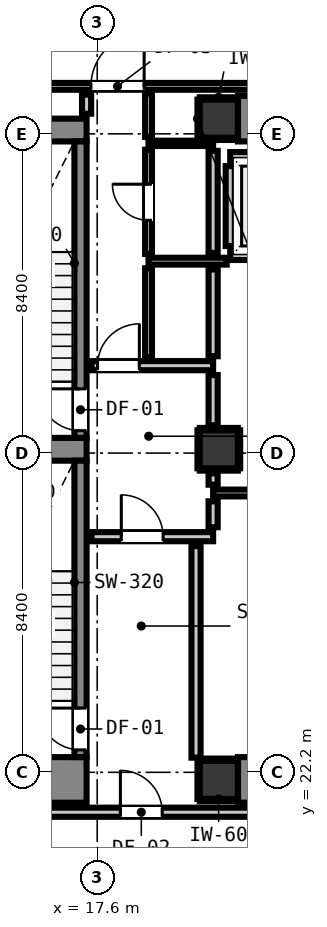
"""IFC4 building model, lengths in metres.
Left out: names, types, materials, properties, quantities, classifications, styles, units other than length and angle.
Written with IfcOpenShell. Run it as: python <this file> out.ifc"""

import sys

from ifc_helpers import new_model, si_unit, direction, frame, frame_2d, origin, origin_2d, place, context, subcontext, project, spatial, rectangle, extrude, element, fill, save


model = new_model("IFC4")
c1 = context("Model", 3, precision=1e-05, world=origin(), true_north=direction((0.0, 1.0)))
c2 = subcontext(c1, "Body", "Model", "MODEL_VIEW")
j1 = project(units=[si_unit("LENGTHUNIT", "METRE"), si_unit("PLANEANGLEUNIT", "RADIAN")], contexts=[c1])
p1 = place(None, origin())
s1 = spatial("IfcSite", under=j1, at=p1, CompositionType="ELEMENT")
p2 = place(p1, origin())
s2 = spatial("IfcBuilding", under=s1, at=p2, CompositionType="ELEMENT")
p3 = place(p2, frame((0.0, 0.0, 13.6)))
s3 = spatial("IfcBuildingStorey", under=s2, at=p3, CompositionType="ELEMENT", Elevation=13.6)
for number, where, z_axis, x_axis in (
    (1, (20.8, 22.0, 0.0), (0.0, 0.0, 1.0), (1.0, 0.0, 0.0)),
    (2, (20.8, 39.4, 0.0), (0.0, 0.0, 1.0), (1.0, 0.0, 0.0)),
):
    element("IfcColumn", number, at=place(p3, frame(where, z_axis=z_axis, x_axis=x_axis)), inside=s3, PredefinedType="COLUMN", context=c2, shape_type="SweptSolid", body=[
        extrude(rectangle(XDim=1.0, YDim=1.0, at=origin_2d()), origin(), (0.0, 0.0, 1.0), 4.2),
    ])
p4 = place(p3, frame((13.24, 22.0, 0.0), z_axis=(0.0, 0.0, 1.0), x_axis=(1.0, 0.0, 0.0)))
e3 = element("IfcWall", 3, at=p4, inside=s3, PredefinedType="SHEAR", context=c2, shape_type="SweptSolid", body=[
    extrude(rectangle(XDim=4.08, YDim=1.2, at=frame_2d((2.04, 0.0))), origin(), (0.0, 0.0, 1.0), 4.2),
])
p5 = place(p3, frame((13.24, 39.1, 0.0), z_axis=(0.0, 0.0, 1.0), x_axis=(1.0, 0.0, 0.0)))
e4 = element("IfcWall", 4, at=p5, inside=s3, PredefinedType="SHEAR", context=c2, shape_type="SweptSolid", body=[
    extrude(rectangle(XDim=4.08, YDim=0.6, at=frame_2d((2.04, 0.0))), origin(), (0.0, 0.0, 1.0), 4.2),
])
p6 = place(p3, frame((13.905, 30.7, 0.0), z_axis=(0.0, 0.0, 1.0), x_axis=(1.0, 0.0, 0.0)))
e5 = element("IfcWall", 5, at=p6, inside=s3, PredefinedType="SHEAR", context=c2, shape_type="SweptSolid", body=[
    extrude(rectangle(XDim=3.415, YDim=0.6, at=frame_2d((1.708, 0.0))), origin(), (0.0, 0.0, 1.0), 4.2),
])
for number, where, z_axis, x_axis in (
    (6, (21.305, 22.0, 0.0), (0.0, 0.0, 1.0), (1.0, 0.0, 0.0)),
    (7, (21.305, 39.4, 0.0), (0.0, 0.0, 1.0), (1.0, 0.0, 0.0)),
):
    element("IfcWall", number, at=place(p3, frame(where, z_axis=z_axis, x_axis=x_axis)), inside=s3, PredefinedType="SHEAR", context=c2, shape_type="SweptSolid", body=[
        extrude(rectangle(XDim=7.39, YDim=1.2, at=frame_2d((3.695, 0.0))), origin(), (0.0, 0.0, 1.0), 4.2),
    ])
p7 = place(p3, frame((17.16, 31.0, 0.0), z_axis=(0.0, 0.0, 1.0), x_axis=(0.0, 1.0, 0.0)))
e8 = element("IfcWall", 8, at=p7, inside=s3, PredefinedType="SHEAR", context=c2, shape_type="SweptSolid", body=[
    extrude(rectangle(XDim=7.8, YDim=0.32, at=frame_2d((3.9, 0.0))), origin(), (0.0, 0.0, 1.0), 4.2),
])
p8 = place(p7, frame((0.19, 0.0, 0.0)))
e9 = element("IfcOpeningElement", 9, at=p8, cuts=e8, PredefinedType="OPENING", context=c2, shape_type="SweptSolid", body=[
    extrude(rectangle(XDim=1.1, YDim=2.15, at=frame_2d((0.55, 1.075))), frame((0.0, 0.17, 0.0), z_axis=(0.0, -1.0, 0.0), x_axis=(1.0, 0.0, 0.0)), (0.0, 0.0, 1.0), 0.34),
])
p9 = place(p3, frame((17.16, 22.6, 0.0), z_axis=(0.0, 0.0, 1.0), x_axis=(0.0, 1.0, 0.0)))
e10 = element("IfcWall", 10, at=p9, inside=s3, PredefinedType="SHEAR", context=c2, shape_type="SweptSolid", body=[
    extrude(rectangle(XDim=7.8, YDim=0.32, at=frame_2d((3.9, 0.0))), origin(), (0.0, 0.0, 1.0), 4.2),
])
p10 = place(p9, frame((0.19, 0.0, 0.0)))
e11 = element("IfcOpeningElement", 11, at=p10, cuts=e10, PredefinedType="OPENING", context=c2, shape_type="SweptSolid", body=[
    extrude(rectangle(XDim=1.1, YDim=2.15, at=frame_2d((0.55, 1.075))), frame((0.0, 0.17, 0.0), z_axis=(0.0, -1.0, 0.0), x_axis=(1.0, 0.0, 0.0)), (0.0, 0.0, 1.0), 0.34),
])
p11 = place(p3, frame((20.8, 30.7, 0.0), z_axis=(0.0, 0.0, 1.0), x_axis=(1.0, 0.0, 0.0)))
e12 = element("IfcColumn", 12, at=p11, inside=s3, PredefinedType="COLUMN", context=c2, shape_type="SweptSolid", body=[
    extrude(rectangle(XDim=1.0, YDim=1.0, at=origin_2d()), origin(), (0.0, 0.0, 1.0), 4.2),
])
for number, where, z_axis, x_axis in (
    (13, (21.1, 35.8, 0.0), (0.0, 0.0, 1.0), (1.0, 0.0, 0.0)),
    (14, (21.1, 38.4, 0.0), (0.0, 0.0, 1.0), (1.0, 0.0, 0.0)),
):
    element("IfcWall", number, at=place(p3, frame(where, z_axis=z_axis, x_axis=x_axis)), inside=s3, PredefinedType="PARTITIONING", context=c2, shape_type="SweptSolid", body=[
        extrude(rectangle(XDim=2.2, YDim=0.24, at=frame_2d((1.1, 0.0))), origin(), (0.0, 0.0, 1.0), 3.78),
    ])
p12 = place(p3, frame((21.1, 36.048, 0.0), z_axis=(0.0, 0.0, 1.0), x_axis=(0.0, 1.0, 0.0)))
e15 = element("IfcWall", 15, at=p12, inside=s3, PredefinedType="PARTITIONING", context=c2, shape_type="SweptSolid", body=[
    extrude(rectangle(XDim=2.104, YDim=0.24, at=frame_2d((1.052, 0.0))), origin(), (0.0, 0.0, 1.0), 2.815),
])
p13 = place(p3, frame((10.5, 21.15, 0.0), z_axis=(0.0, 0.0, 1.0), x_axis=(1.0, 0.0, 0.0)))
e16 = element("IfcWall", 16, at=p13, inside=s3, PredefinedType="PARTITIONING", context=c2, shape_type="SweptSolid", body=[
    extrude(rectangle(XDim=28.7, YDim=0.24, at=frame_2d((14.35, 0.0))), origin(), (0.0, 0.0, 1.0), 3.78),
])
p14 = place(p13, frame((7.71, 0.0, 0.0)))
e17 = element("IfcOpeningElement", 17, at=p14, cuts=e16, PredefinedType="OPENING", context=c2, shape_type="SweptSolid", body=[
    extrude(rectangle(XDim=1.1, YDim=2.15, at=frame_2d((0.55, 1.075))), frame((0.0, 0.13, 0.0), z_axis=(0.0, -1.0, 0.0), x_axis=(1.0, 0.0, 0.0)), (0.0, 0.0, 1.0), 0.26),
])
p15 = place(p13, frame((0.324, 0.0, 0.0)))
e18 = element("IfcOpeningElement", 18, at=p15, cuts=e16, PredefinedType="OPENING", context=c2, shape_type="SweptSolid", body=[
    extrude(rectangle(XDim=1.4, YDim=2.15, at=frame_2d((0.7, 1.075))), frame((0.0, 0.13, 0.0), z_axis=(0.0, -1.0, 0.0), x_axis=(1.0, 0.0, 0.0)), (0.0, 0.0, 1.0), 0.26),
])
p16 = place(p13, frame((27.026, 0.0, 0.0)))
e19 = element("IfcOpeningElement", 19, at=p16, cuts=e16, PredefinedType="OPENING", context=c2, shape_type="SweptSolid", body=[
    extrude(rectangle(XDim=1.4, YDim=2.15, at=frame_2d((0.7, 1.075))), frame((0.0, 0.13, 0.0), z_axis=(0.0, -1.0, 0.0), x_axis=(1.0, 0.0, 0.0)), (0.0, 0.0, 1.0), 0.26),
])
p17 = place(p3, frame((17.45, 28.4, 0.0), z_axis=(0.0, 0.0, 1.0), x_axis=(1.0, 0.0, 0.0)))
e20 = element("IfcWall", 20, at=p17, inside=s3, PredefinedType="PARTITIONING", context=c2, shape_type="SweptSolid", body=[
    extrude(rectangle(XDim=3.2, YDim=0.24, at=frame_2d((1.6, 0.0))), origin(), (0.0, 0.0, 1.0), 3.78),
])
p18 = place(p17, frame((0.784, 0.0, 0.0)))
e21 = element("IfcOpeningElement", 21, at=p18, cuts=e20, PredefinedType="OPENING", context=c2, shape_type="SweptSolid", body=[
    extrude(rectangle(XDim=1.1, YDim=2.15, at=frame_2d((0.55, 1.075))), frame((0.0, 0.13, 0.0), z_axis=(0.0, -1.0, 0.0), x_axis=(1.0, 0.0, 0.0)), (0.0, 0.0, 1.0), 0.26),
])
p19 = place(p3, frame((17.45, 32.9, 0.0), z_axis=(0.0, 0.0, 1.0), x_axis=(1.0, 0.0, 0.0)))
e22 = element("IfcWall", 22, at=p19, inside=s3, PredefinedType="PARTITIONING", context=c2, shape_type="SweptSolid", body=[
    extrude(rectangle(XDim=3.2, YDim=0.24, at=frame_2d((1.6, 0.0))), origin(), (0.0, 0.0, 1.0), 3.78),
])
p20 = place(p19, frame((0.159, 0.0, 0.0)))
e23 = element("IfcOpeningElement", 23, at=p20, cuts=e22, PredefinedType="OPENING", context=c2, shape_type="SweptSolid", body=[
    extrude(rectangle(XDim=1.1, YDim=2.15, at=frame_2d((0.55, 1.075))), frame((0.0, 0.13, 0.0), z_axis=(0.0, -1.0, 0.0), x_axis=(1.0, 0.0, 0.0)), (0.0, 0.0, 1.0), 0.26),
])
p21 = place(p3, frame((20.65, 29.55, 0.0), z_axis=(0.0, 0.0, 1.0), x_axis=(1.0, 0.0, 0.0)))
e24 = element("IfcWall", 24, at=p21, inside=s3, PredefinedType="PARTITIONING", context=c2, shape_type="SweptSolid", body=[
    extrude(rectangle(XDim=9.325, YDim=0.18, at=frame_2d((4.663, 0.0))), origin(), (0.0, 0.0, 1.0), 3.78),
])
p22 = place(p3, frame((18.95, 35.65, 0.0), z_axis=(0.0, 0.0, 1.0), x_axis=(1.0, 0.0, 0.0)))
e25 = element("IfcWall", 25, at=p22, inside=s3, PredefinedType="PARTITIONING", context=c2, shape_type="SweptSolid", body=[
    extrude(rectangle(XDim=2.057, YDim=0.18, at=frame_2d((1.029, 0.0))), origin(), (0.0, 0.0, 1.0), 3.78),
])
p23 = place(p3, frame((10.5, 40.25, 0.0), z_axis=(0.0, 0.0, 1.0), x_axis=(1.0, 0.0, 0.0)))
e26 = element("IfcWall", 26, at=p23, inside=s3, PredefinedType="PARTITIONING", context=c2, shape_type="SweptSolid", body=[
    extrude(rectangle(XDim=37.2, YDim=0.18, at=frame_2d((18.6, 0.0))), origin(), (0.0, 0.0, 1.0), 3.78),
])
p24 = place(p23, frame((6.935, 0.0, 0.0)))
e27 = element("IfcOpeningElement", 27, at=p24, cuts=e26, PredefinedType="OPENING", context=c2, shape_type="SweptSolid", body=[
    extrude(rectangle(XDim=1.4, YDim=2.15, at=frame_2d((0.7, 1.075))), frame((0.0, 0.1, 0.0), z_axis=(0.0, -1.0, 0.0), x_axis=(1.0, 0.0, 0.0)), (0.0, 0.0, 1.0), 0.2),
])
p25 = place(p23, frame((0.324, 0.0, 0.0)))
e28 = element("IfcOpeningElement", 28, at=p25, cuts=e26, PredefinedType="OPENING", context=c2, shape_type="SweptSolid", body=[
    extrude(rectangle(XDim=1.4, YDim=2.15, at=frame_2d((0.7, 1.075))), frame((0.0, 0.1, 0.0), z_axis=(0.0, -1.0, 0.0), x_axis=(1.0, 0.0, 0.0)), (0.0, 0.0, 1.0), 0.2),
])
p26 = place(p23, frame((27.05, 0.0, 0.0)))
e29 = element("IfcOpeningElement", 29, at=p26, cuts=e26, PredefinedType="OPENING", context=c2, shape_type="SweptSolid", body=[
    extrude(rectangle(XDim=1.4, YDim=2.15, at=frame_2d((0.7, 1.075))), frame((0.0, 0.1, 0.0), z_axis=(0.0, -1.0, 0.0), x_axis=(1.0, 0.0, 0.0)), (0.0, 0.0, 1.0), 0.2),
])
p27 = place(p3, frame((18.95, 38.75, 0.0), z_axis=(0.0, 0.0, 1.0), x_axis=(1.0, 0.0, 0.0)))
e30 = element("IfcWall", 30, at=p27, inside=s3, PredefinedType="PARTITIONING", context=c2, shape_type="SweptSolid", body=[
    extrude(rectangle(XDim=1.7, YDim=0.14, at=frame_2d((0.85, 0.0))), origin(), (0.0, 0.0, 1.0), 3.78),
])
p28 = place(p3, frame((17.32, 39.53, 0.0), z_axis=(0.0, 0.0, 1.0), x_axis=(0.0, 1.0, 0.0)))
e31 = element("IfcWall", 31, at=p28, inside=s3, PredefinedType="PARTITIONING", context=c2, shape_type="SweptSolid", body=[
    extrude(rectangle(XDim=0.502, YDim=0.24, at=frame_2d((0.251, 0.0))), origin(), (0.0, 0.0, 1.0), 3.78),
])
p29 = place(p3, frame((20.2, 22.586, 0.0), z_axis=(0.0, 0.0, 1.0), x_axis=(0.0, 1.0, 0.0)))
e32 = element("IfcWall", 32, at=p29, inside=s3, PredefinedType="PARTITIONING", context=c2, shape_type="SweptSolid", body=[
    extrude(rectangle(XDim=5.566, YDim=0.24, at=frame_2d((2.783, 0.0))), origin(), (0.0, 0.0, 1.0), 3.78),
])
p30 = place(p3, frame((20.65, 28.648, 0.0), z_axis=(0.0, 0.0, 1.0), x_axis=(0.0, 1.0, 0.0)))
e33 = element("IfcWall", 33, at=p30, inside=s3, PredefinedType="PARTITIONING", context=c2, shape_type="SweptSolid", body=[
    extrude(rectangle(XDim=0.684, YDim=0.24, at=frame_2d((0.342, 0.0))), origin(), (0.0, 0.0, 1.0), 2.815),
])
p31 = place(p3, frame((20.65, 29.768, 0.0), z_axis=(0.0, 0.0, 1.0), x_axis=(0.0, 1.0, 0.0)))
e34 = element("IfcWall", 34, at=p31, inside=s3, PredefinedType="PARTITIONING", context=c2, shape_type="SweptSolid", body=[
    extrude(rectangle(XDim=0.3, YDim=0.24, at=frame_2d((0.15, 0.0))), origin(), (0.0, 0.0, 1.0), 2.815),
])
p32 = place(p3, frame((20.65, 31.332, 0.0), z_axis=(0.0, 0.0, 1.0), x_axis=(0.0, 1.0, 0.0)))
e35 = element("IfcWall", 35, at=p32, inside=s3, PredefinedType="PARTITIONING", context=c2, shape_type="SweptSolid", body=[
    extrude(rectangle(XDim=1.32, YDim=0.24, at=frame_2d((0.66, 0.0))), origin(), (0.0, 0.0, 1.0), 2.815),
])
p33 = place(p3, frame((20.65, 33.148, 0.0), z_axis=(0.0, 0.0, 1.0), x_axis=(0.0, 1.0, 0.0)))
e36 = element("IfcWall", 36, at=p33, inside=s3, PredefinedType="PARTITIONING", context=c2, shape_type="SweptSolid", body=[
    extrude(rectangle(XDim=2.284, YDim=0.24, at=frame_2d((1.142, 0.0))), origin(), (0.0, 0.0, 1.0), 2.815),
])
p34 = place(p3, frame((20.65, 35.868, 0.0), z_axis=(0.0, 0.0, 1.0), x_axis=(0.0, 1.0, 0.0)))
e37 = element("IfcWall", 37, at=p34, inside=s3, PredefinedType="PARTITIONING", context=c2, shape_type="SweptSolid", body=[
    extrude(rectangle(XDim=2.684, YDim=0.24, at=frame_2d((1.342, 0.0))), origin(), (0.0, 0.0, 1.0), 2.815),
])
p35 = place(p3, frame((18.95, 33.118, 0.0), z_axis=(0.0, 0.0, 1.0), x_axis=(0.0, 1.0, 0.0)))
e38 = element("IfcWall", 38, at=p35, inside=s3, PredefinedType="PARTITIONING", context=c2, shape_type="SweptSolid", body=[
    extrude(rectangle(XDim=2.344, YDim=0.18, at=frame_2d((1.172, 0.0))), origin(), (0.0, 0.0, 1.0), 3.78),
])
p36 = place(p3, frame((18.95, 35.838, 0.0), z_axis=(0.0, 0.0, 1.0), x_axis=(0.0, 1.0, 0.0)))
e39 = element("IfcWall", 39, at=p36, inside=s3, PredefinedType="PARTITIONING", context=c2, shape_type="SweptSolid", body=[
    extrude(rectangle(XDim=2.744, YDim=0.18, at=frame_2d((1.372, 0.0))), origin(), (0.0, 0.0, 1.0), 3.78),
])
p37 = place(p36, frame((0.887, 0.0, 0.0)))
e40 = element("IfcOpeningElement", 40, at=p37, cuts=e39, PredefinedType="OPENING", context=c2, shape_type="SweptSolid", body=[
    extrude(rectangle(XDim=0.95, YDim=2.1, at=frame_2d((0.475, 1.05))), frame((0.0, 0.1, 0.0), z_axis=(0.0, -1.0, 0.0), x_axis=(1.0, 0.0, 0.0)), (0.0, 0.0, 1.0), 0.2),
])
p38 = place(p3, frame((18.95, 38.918, 0.0), z_axis=(0.0, 0.0, 1.0), x_axis=(0.0, 1.0, 0.0)))
e41 = element("IfcWall", 41, at=p38, inside=s3, PredefinedType="PARTITIONING", context=c2, shape_type="SweptSolid", body=[
    extrude(rectangle(XDim=1.144, YDim=0.18, at=frame_2d((0.572, 0.0))), origin(), (0.0, 0.0, 1.0), 3.78),
])
for number, where, z_axis, x_axis in (
    (42, (20.3, 21.468, 0.0), (0.0, 0.0, 1.0), (1.0, 0.0, 0.0)),
    (43, (20.3, 22.532, 0.0), (0.0, 0.0, 1.0), (1.0, 0.0, 0.0)),
):
    element("IfcWall", number, at=place(p3, frame(where, z_axis=z_axis, x_axis=x_axis)), inside=s3, PredefinedType="PARTITIONING", context=c2, shape_type="SweptSolid", body=[
        extrude(rectangle(XDim=0.99, YDim=0.06, at=frame_2d((0.495, 0.0))), origin(), (0.0, 0.0, 1.0), 1.45),
    ])
p39 = place(p3, frame((20.268, 21.5, 0.0), z_axis=(0.0, 0.0, 1.0), x_axis=(0.0, 1.0, 0.0)))
e44 = element("IfcWall", 44, at=p39, inside=s3, PredefinedType="PARTITIONING", context=c2, shape_type="SweptSolid", body=[
    extrude(rectangle(XDim=1.0, YDim=0.06, at=frame_2d((0.5, 0.0))), origin(), (0.0, 0.0, 1.0), 1.45),
])
for number, where, z_axis, x_axis in (
    (45, (20.3, 38.868, 0.0), (0.0, 0.0, 1.0), (1.0, 0.0, 0.0)),
    (46, (20.3, 39.932, 0.0), (0.0, 0.0, 1.0), (1.0, 0.0, 0.0)),
):
    element("IfcWall", number, at=place(p3, frame(where, z_axis=z_axis, x_axis=x_axis)), inside=s3, PredefinedType="PARTITIONING", context=c2, shape_type="SweptSolid", body=[
        extrude(rectangle(XDim=0.99, YDim=0.06, at=frame_2d((0.495, 0.0))), origin(), (0.0, 0.0, 1.0), 1.45),
    ])
for number, where, z_axis, x_axis in (
    (47, (20.268, 38.9, 0.0), (0.0, 0.0, 1.0), (0.0, 1.0, 0.0)),
    (48, (20.3, 30.168, 0.0), (0.0, 0.0, 1.0), (1.0, 0.0, 0.0)),
    (49, (20.3, 31.232, 0.0), (0.0, 0.0, 1.0), (1.0, 0.0, 0.0)),
    (50, (20.268, 30.2, 0.0), (0.0, 0.0, 1.0), (0.0, 1.0, 0.0)),
    (51, (21.332, 30.2, 0.0), (0.0, 0.0, 1.0), (0.0, 1.0, 0.0)),
):
    element("IfcWall", number, at=place(p3, frame(where, z_axis=z_axis, x_axis=x_axis)), inside=s3, PredefinedType="PARTITIONING", context=c2, shape_type="SweptSolid", body=[
        extrude(rectangle(XDim=1.0, YDim=0.06, at=frame_2d((0.5, 0.0))), origin(), (0.0, 0.0, 1.0), 1.45),
    ])
p40 = place(p8, origin())
e52 = element("IfcDoor", 52, at=p40, inside=s3, OperationType="SINGLE_SWING_RIGHT", PredefinedType="DOOR", context=c2, shape_type="SweptSolid", body=[
    extrude(rectangle(XDim=1.1, YDim=2.15, at=frame_2d((0.55, 1.075))), frame((0.0, 0.025, 0.0), z_axis=(0.0, -1.0, 0.0), x_axis=(1.0, 0.0, 0.0)), (0.0, 0.0, 1.0), 0.05),
])
fill(e9, e52)
p41 = place(p10, origin())
e53 = element("IfcDoor", 53, at=p41, inside=s3, OperationType="SINGLE_SWING_RIGHT", PredefinedType="DOOR", context=c2, shape_type="SweptSolid", body=[
    extrude(rectangle(XDim=1.1, YDim=2.15, at=frame_2d((0.55, 1.075))), frame((0.0, 0.025, 0.0), z_axis=(0.0, -1.0, 0.0), x_axis=(1.0, 0.0, 0.0)), (0.0, 0.0, 1.0), 0.05),
])
fill(e11, e53)
p42 = place(p18, origin())
e54 = element("IfcDoor", 54, at=p42, inside=s3, OperationType="SINGLE_SWING_LEFT", PredefinedType="DOOR", context=c2, shape_type="SweptSolid", body=[
    extrude(rectangle(XDim=1.1, YDim=2.15, at=frame_2d((0.55, 1.075))), frame((0.0, 0.025, 0.0), z_axis=(0.0, -1.0, 0.0), x_axis=(1.0, 0.0, 0.0)), (0.0, 0.0, 1.0), 0.05),
])
fill(e21, e54)
p43 = place(p20, origin())
e55 = element("IfcDoor", 55, at=p43, inside=s3, OperationType="SINGLE_SWING_RIGHT", PredefinedType="DOOR", context=c2, shape_type="SweptSolid", body=[
    extrude(rectangle(XDim=1.1, YDim=2.15, at=frame_2d((0.55, 1.075))), frame((0.0, 0.025, 0.0), z_axis=(0.0, -1.0, 0.0), x_axis=(1.0, 0.0, 0.0)), (0.0, 0.0, 1.0), 0.05),
])
fill(e23, e55)
p44 = place(p14, origin())
e56 = element("IfcDoor", 56, at=p44, inside=s3, OperationType="SINGLE_SWING_LEFT", PredefinedType="DOOR", context=c2, shape_type="SweptSolid", body=[
    extrude(rectangle(XDim=1.1, YDim=2.15, at=frame_2d((0.55, 1.075))), frame((0.0, 0.025, 0.0), z_axis=(0.0, -1.0, 0.0), x_axis=(1.0, 0.0, 0.0)), (0.0, 0.0, 1.0), 0.05),
])
fill(e17, e56)
p45 = place(p24, origin())
e57 = element("IfcDoor", 57, at=p45, inside=s3, OperationType="SINGLE_SWING_RIGHT", PredefinedType="DOOR", context=c2, shape_type="SweptSolid", body=[
    extrude(rectangle(XDim=1.4, YDim=2.15, at=frame_2d((0.7, 1.075))), frame((0.0, 0.025, 0.0), z_axis=(0.0, -1.0, 0.0), x_axis=(1.0, 0.0, 0.0)), (0.0, 0.0, 1.0), 0.05),
])
fill(e27, e57)
p46 = place(p37, origin())
e58 = element("IfcDoor", 58, at=p46, inside=s3, OperationType="SINGLE_SWING_RIGHT", PredefinedType="DOOR", context=c2, shape_type="SweptSolid", body=[
    extrude(rectangle(XDim=0.95, YDim=2.1, at=frame_2d((0.475, 1.05))), frame((0.0, 0.025, 0.0), z_axis=(0.0, -1.0, 0.0), x_axis=(1.0, 0.0, 0.0)), (0.0, 0.0, 1.0), 0.05),
])
fill(e40, e58)
save(model, sys.argv[1])
